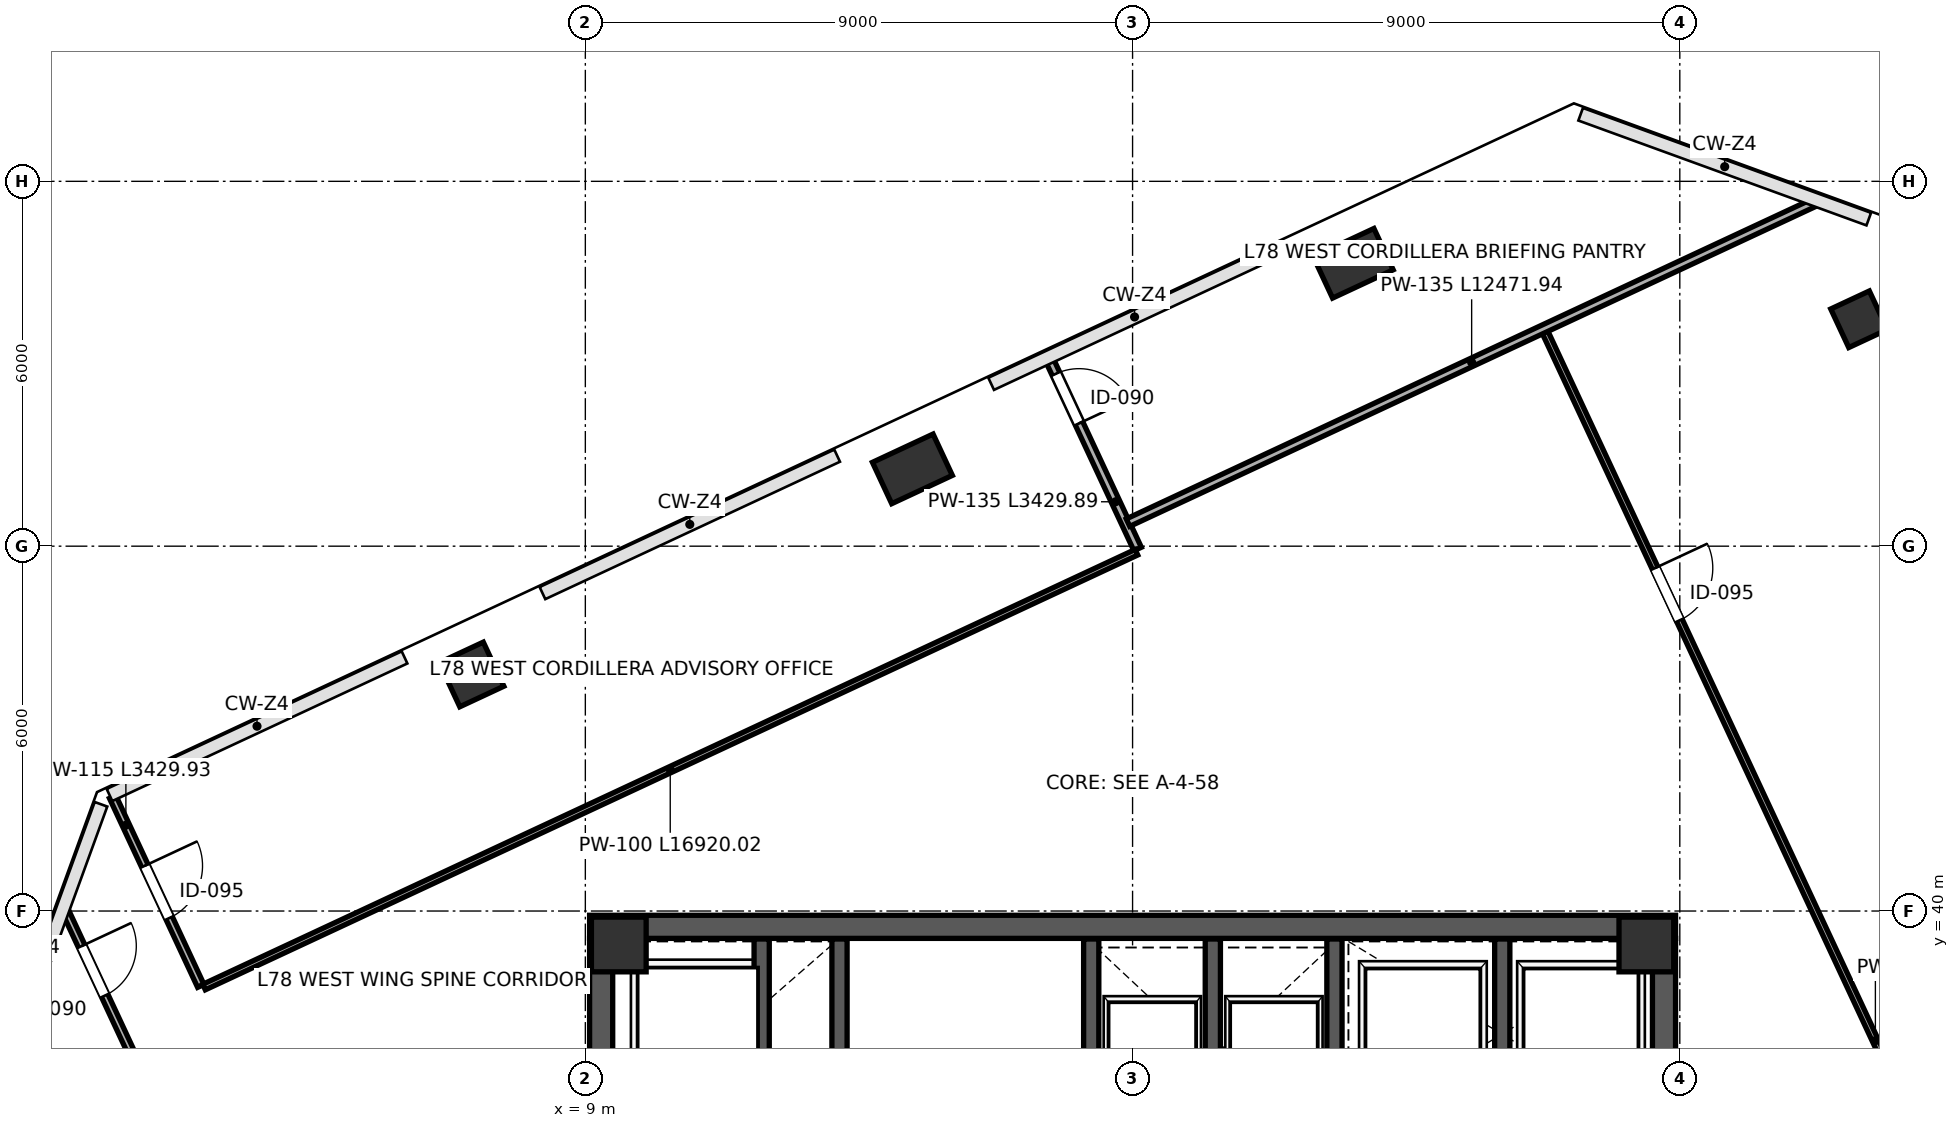
"""IFC4 building model, lengths in metres.
Left out: names, types, materials, properties, quantities, classifications, styles, units other than length and angle.
Written with IfcOpenShell. Run it as: python <this file> out.ifc"""

import sys

from ifc_helpers import new_model, si_unit, direction, frame, frame_2d, origin, origin_2d, place, context, subcontext, project, spatial, rectangle, extrude, clip, halfspace, source, transform, mapped, element, fill, save


model = new_model("IFC4")
c1 = context("Model", 3, precision=1e-05, world=origin(), true_north=direction((0.0, 1.0)))
c2 = subcontext(c1, "Body", "Model", "MODEL_VIEW")
j1 = project(units=[si_unit("LENGTHUNIT", "METRE"), si_unit("PLANEANGLEUNIT", "RADIAN")], contexts=[c1])
p1 = place(None, origin())
s1 = spatial("IfcSite", under=j1, at=p1, CompositionType="ELEMENT")
p2 = place(p1, origin())
s2 = spatial("IfcBuilding", under=s1, at=p2, CompositionType="ELEMENT")
p3 = place(p2, frame((0.0, 0.0, 345.0)))
s3 = spatial("IfcBuildingStorey", under=s2, at=p3, CompositionType="ELEMENT", Elevation=345.0)
m1 = source(origin(), c2, "Body", "SweptSolid", [
    extrude(rectangle(XDim=0.9, YDim=0.9, at=origin_2d()), origin(), (0.0, 0.0, 1.0), 4.198),
])
for number, where, z_axis, x_axis in (
    (1, (9.55, 39.45, 0.001), (0.0, 0.0, 1.0), (1.0, 0.0, 0.0)),
    (2, (26.45, 39.45, 0.001), (0.0, 0.0, 1.0), (1.0, 0.0, 0.0)),
):
    element("IfcColumn", number, at=place(p3, frame(where, z_axis=z_axis, x_axis=x_axis)), inside=s3, PredefinedType="COLUMN", context=c2, shape_type="MappedRepresentation", body=[
        mapped(m1, transform((0.0, 0.0, 0.0), scale=1.0)),
    ])
p4 = place(p3, frame((29.948, 49.731, 0.0), z_axis=(0.178557414526, -0.08987674645, 0.979816013426), x_axis=(-0.98321057794, 0.02176204754, 0.181172218384)))
e3 = element("IfcColumn", 3, at=p4, inside=s3, PredefinedType="COLUMN", context=c2, shape_type="Clipping", body=[
    clip(clip(extrude(rectangle(XDim=0.7, YDim=0.7, at=origin_2d()), origin(), (0.0, 0.0, 1.0), 4.286), halfspace(frame((0.0, 0.0, 0.096), z_axis=(0.0, 0.0, -1.0), x_axis=(1.0, 0.0, 0.0)), False)), halfspace(frame((0.0, 0.0, 4.191), z_axis=(0.0, 0.0, 1.0), x_axis=(1.0, 0.0, 0.0)), False)),
])
p5 = place(p3, frame((7.128, 43.89, 0.0), z_axis=(0.124408828393, 0.143869108431, 0.981745447179), x_axis=(-0.262317770415, -0.949460239356, 0.172379352608)))
e4 = element("IfcColumn", 4, at=p5, inside=s3, PredefinedType="COLUMN", context=c2, shape_type="Clipping", body=[
    clip(clip(extrude(rectangle(XDim=0.8, YDim=0.8, at=origin_2d()), origin(), (0.0, 0.0, 1.0), 4.278), halfspace(frame((0.0, 0.0, 0.104), z_axis=(0.0, 0.0, -1.0), x_axis=(1.0, 0.0, 0.0)), False)), halfspace(frame((0.0, 0.0, 4.174), z_axis=(0.0, 0.0, 1.0), x_axis=(1.0, 0.0, 0.0)), False)),
])
p6 = place(p3, frame((14.379, 47.271, 0.0), z_axis=(0.157805484492, 0.069455026375, 0.985024582625), x_axis=(-0.646847803691, -0.74643867604, 0.156260109342)))
e5 = element("IfcColumn", 5, at=p6, inside=s3, PredefinedType="PILASTER", context=c2, shape_type="Clipping", body=[
    clip(clip(extrude(rectangle(XDim=0.75, YDim=1.1, at=origin_2d()), origin(), (0.0, 0.0, 1.0), 4.264), halfspace(frame((0.0, 0.0, 0.101), z_axis=(0.0, 0.0, -1.0), x_axis=(1.0, 0.0, 0.0)), False)), halfspace(frame((0.0, 0.0, 4.163), z_axis=(0.0, 0.0, 1.0), x_axis=(1.0, 0.0, 0.0)), False)),
])
p7 = place(p3, frame((21.629, 50.652, 0.0), z_axis=(0.190150420075, -0.005421455554, 0.981739998964), x_axis=(-0.901441729495, -0.39708863024, 0.172404837691)))
e6 = element("IfcColumn", 6, at=p7, inside=s3, PredefinedType="PILASTER", context=c2, shape_type="Clipping", body=[
    clip(clip(extrude(rectangle(XDim=0.75, YDim=1.1, at=origin_2d()), origin(), (0.0, 0.0, 1.0), 4.278), halfspace(frame((0.0, 0.0, 0.112), z_axis=(0.0, 0.0, -1.0), x_axis=(1.0, 0.0, 0.0)), False)), halfspace(frame((0.0, 0.0, 4.167), z_axis=(0.0, 0.0, 1.0), x_axis=(1.0, 0.0, 0.0)), False)),
])
p8 = place(p3, frame((9.26, 24.45, 0.0), z_axis=(0.0, 0.0, 1.0), x_axis=(0.0, 1.0, 0.0)))
e7 = element("IfcWall", 7, at=p8, inside=s3, PredefinedType="SHEAR", context=c2, shape_type="SweptSolid", body=[
    extrude(rectangle(XDim=15.1, YDim=0.38, at=frame_2d((7.55, 0.0))), origin(), (0.0, 0.0, 1.0), 3.92),
])
p9 = place(p8, frame((8.7, 0.0, 0.0)))
e8 = element("IfcOpeningElement", 8, at=p9, cuts=e7, PredefinedType="OPENING", context=c2, shape_type="SweptSolid", body=[
    extrude(rectangle(XDim=1.15, YDim=2.2, at=frame_2d((0.575, 1.1))), frame((0.0, 0.2, 0.0), z_axis=(0.0, -1.0, 0.0), x_axis=(1.0, 0.0, 0.0)), (0.0, 0.0, 1.0), 0.4),
])
p10 = place(p3, frame((26.74, 24.45, 0.0), z_axis=(0.0, 0.0, 1.0), x_axis=(0.0, 1.0, 0.0)))
e9 = element("IfcWall", 9, at=p10, inside=s3, PredefinedType="SHEAR", context=c2, shape_type="SweptSolid", body=[
    extrude(rectangle(XDim=15.1, YDim=0.38, at=frame_2d((7.55, 0.0))), origin(), (0.0, 0.0, 1.0), 3.92),
])
p11 = place(p10, frame((8.6, 0.0, 0.0)))
e10 = element("IfcOpeningElement", 10, at=p11, cuts=e9, PredefinedType="OPENING", context=c2, shape_type="SweptSolid", body=[
    extrude(rectangle(XDim=1.15, YDim=2.2, at=frame_2d((0.575, 1.1))), frame((0.0, 0.2, 0.0), z_axis=(0.0, -1.0, 0.0), x_axis=(1.0, 0.0, 0.0)), (0.0, 0.0, 1.0), 0.4),
])
p12 = place(p3, frame((9.07, 39.74, 0.0), z_axis=(0.0, 0.0, 1.0), x_axis=(1.0, 0.0, 0.0)))
e11 = element("IfcWall", 11, at=p12, inside=s3, PredefinedType="SHEAR", context=c2, shape_type="SweptSolid", body=[
    extrude(rectangle(XDim=17.86, YDim=0.38, at=frame_2d((8.93, 0.0))), origin(), (0.0, 0.0, 1.0), 3.92),
])
p13 = place(p3, frame((21.32, 32.12, 0.0), z_axis=(0.0, 0.0, 1.0), x_axis=(0.0, 1.0, 0.0)))
e12 = element("IfcWall", 12, at=p13, inside=s3, PredefinedType="SHEAR", context=c2, shape_type="SweptSolid", body=[
    extrude(rectangle(XDim=7.42, YDim=0.25, at=frame_2d((3.71, 0.0))), origin(), (0.0, 0.0, 1.0), 3.92),
])
p14 = place(p13, frame((1.4, 0.0, 0.0)))
e13 = element("IfcOpeningElement", 13, at=p14, cuts=e12, PredefinedType="OPENING", context=c2, shape_type="SweptSolid", body=[
    extrude(rectangle(XDim=1.15, YDim=2.2, at=frame_2d((0.575, 1.1))), frame((0.0, 0.135, 0.0), z_axis=(0.0, -1.0, 0.0), x_axis=(1.0, 0.0, 0.0)), (0.0, 0.0, 1.0), 0.27),
])
p15 = place(p3, frame((11.9, 36.31, 0.0), z_axis=(0.0, 0.0, 1.0), x_axis=(0.0, 1.0, 0.0)))
e14 = element("IfcWall", 14, at=p15, inside=s3, PredefinedType="SHEAR", context=c2, shape_type="SweptSolid", body=[
    extrude(rectangle(XDim=3.23, YDim=0.25, at=frame_2d((1.615, 0.0))), origin(), (0.0, 0.0, 1.0), 3.92),
])
p16 = place(p3, frame((24.08, 36.48, 0.0), z_axis=(0.0, 0.0, 1.0), x_axis=(0.0, 1.0, 0.0)))
e15 = element("IfcWall", 15, at=p16, inside=s3, PredefinedType="SHEAR", context=c2, shape_type="SweptSolid", body=[
    extrude(rectangle(XDim=3.06, YDim=0.25, at=frame_2d((1.53, 0.0))), origin(), (0.0, 0.0, 1.0), 3.92),
])
p17 = place(p3, frame((13.18, 36.2, 0.0), z_axis=(0.0, 0.0, 1.0), x_axis=(0.0, 1.0, 0.0)))
e16 = element("IfcWall", 16, at=p17, inside=s3, PredefinedType="SHEAR", context=c2, shape_type="SweptSolid", body=[
    extrude(rectangle(XDim=3.34, YDim=0.25, at=frame_2d((1.67, 0.0))), origin(), (0.0, 0.0, 1.0), 3.92),
])
for number, where, z_axis, x_axis in (
    (17, (17.32, 35.81, 0.0), (0.0, 0.0, 1.0), (0.0, 1.0, 0.0)),
    (18, (19.32, 35.81, 0.0), (0.0, 0.0, 1.0), (0.0, 1.0, 0.0)),
):
    element("IfcWall", number, at=place(p3, frame(where, z_axis=z_axis, x_axis=x_axis)), inside=s3, PredefinedType="SHEAR", context=c2, shape_type="SweptSolid", body=[
        extrude(rectangle(XDim=3.73, YDim=0.25, at=frame_2d((1.865, 0.0))), origin(), (0.0, 0.0, 1.0), 3.92),
    ])
p18 = place(p3, frame((0.441, 40.013, 0.0), z_axis=(0.0, 0.0, 1.0), x_axis=(0.422618958231, -0.906307462258, 0.0)))
e19 = element("IfcWall", 19, at=p18, inside=s3, PredefinedType="PARTITIONING", context=c2, shape_type="SweptSolid", body=[
    extrude(rectangle(XDim=7.172, YDim=0.115, at=frame_2d((3.586, 0.0))), origin(), (0.0, 0.0, 1.0), 3.92),
])
p19 = place(p18, frame((0.65, 0.0, 0.0)))
e20 = element("IfcOpeningElement", 20, at=p19, cuts=e19, PredefinedType="OPENING", context=c2, shape_type="SweptSolid", body=[
    extrude(rectangle(XDim=0.9, YDim=2.15, at=frame_2d((0.45, 1.075))), frame((0.0, 0.067, 0.0), z_axis=(0.0, -1.0, 0.0), x_axis=(1.0, 0.0, 0.0)), (0.0, 0.0, 1.0), 0.135),
])
p20 = place(p18, frame((5.55, 0.0, 0.0)))
e21 = element("IfcOpeningElement", 21, at=p20, cuts=e19, PredefinedType="OPENING", context=c2, shape_type="SweptSolid", body=[
    extrude(rectangle(XDim=0.95, YDim=2.15, at=frame_2d((0.475, 1.075))), frame((0.0, 0.067, 0.0), z_axis=(0.0, -1.0, 0.0), x_axis=(1.0, 0.0, 0.0)), (0.0, 0.0, 1.0), 0.135),
])
p21 = place(p3, frame((24.775, 49.537, 0.0), z_axis=(0.0, 0.0, 1.0), x_axis=(0.422615543458, -0.906309054588, 0.0)))
e22 = element("IfcWall", 22, at=p21, inside=s3, PredefinedType="PARTITIONING", context=c2, shape_type="SweptSolid", body=[
    extrude(rectangle(XDim=25.75, YDim=0.1, at=frame_2d((12.875, 0.0))), origin(), (0.0, 0.0, 1.0), 3.92),
])
p22 = place(p21, frame((4.3, 0.0, 0.0)))
e23 = element("IfcOpeningElement", 23, at=p22, cuts=e22, PredefinedType="OPENING", context=c2, shape_type="SweptSolid", body=[
    extrude(rectangle(XDim=0.95, YDim=2.15, at=frame_2d((0.475, 1.075))), frame((0.0, 0.06, 0.0), z_axis=(0.0, -1.0, 0.0), x_axis=(1.0, 0.0, 0.0)), (0.0, 0.0, 1.0), 0.12),
])
p23 = place(p3, frame((16.633, 49.062, 0.0), z_axis=(0.0, 0.0, 1.0), x_axis=(0.422675027226, -0.906281314692, 0.0)))
e24 = element("IfcWall", 24, at=p23, inside=s3, PredefinedType="PARTITIONING", context=c2, shape_type="SweptSolid", body=[
    extrude(rectangle(XDim=3.43, YDim=0.135, at=frame_2d((1.715, 0.0))), origin(), (0.0, 0.0, 1.0), 3.255),
])
p24 = place(p23, frame((0.25, 0.0, 0.0)))
e25 = element("IfcOpeningElement", 25, at=p24, cuts=e24, PredefinedType="OPENING", context=c2, shape_type="SweptSolid", body=[
    extrude(rectangle(XDim=0.9, YDim=2.15, at=frame_2d((0.45, 1.075))), frame((0.0, 0.078, 0.0), z_axis=(0.0, -1.0, 0.0), x_axis=(1.0, 0.0, 0.0)), (0.0, 0.0, 1.0), 0.155),
])
p25 = place(p3, frame((1.226, 41.877, 0.0), z_axis=(0.0, 0.0, 1.0), x_axis=(0.422616560059, -0.906308580542, 0.0)))
e26 = element("IfcWall", 26, at=p25, inside=s3, PredefinedType="PARTITIONING", context=c2, shape_type="SweptSolid", body=[
    extrude(rectangle(XDim=3.43, YDim=0.115, at=frame_2d((1.715, 0.0))), origin(), (0.0, 0.0, 1.0), 3.92),
])
p26 = place(p25, frame((1.25, 0.0, 0.0)))
e27 = element("IfcOpeningElement", 27, at=p26, cuts=e26, PredefinedType="OPENING", context=c2, shape_type="SweptSolid", body=[
    extrude(rectangle(XDim=0.95, YDim=2.15, at=frame_2d((0.475, 1.075))), frame((0.0, 0.067, 0.0), z_axis=(0.0, -1.0, 0.0), x_axis=(1.0, 0.0, 0.0)), (0.0, 0.0, 1.0), 0.135),
])
p27 = place(p3, frame((2.729, 38.749, 0.0), z_axis=(0.0, 0.0, 1.0), x_axis=(0.906303643754, 0.422627146926, 0.0)))
e28 = element("IfcWall", 28, at=p27, inside=s3, PredefinedType="PARTITIONING", context=c2, shape_type="SweptSolid", body=[
    extrude(rectangle(XDim=16.92, YDim=0.1, at=frame_2d((8.46, 0.0))), origin(), (0.0, 0.0, 1.0), 3.212),
])
p28 = place(p3, frame((17.925, 46.387, 0.0), z_axis=(0.0, 0.0, 1.0), x_axis=(0.906304624979, 0.422625042729, 0.0)))
e29 = element("IfcWall", 29, at=p28, inside=s3, PredefinedType="PARTITIONING", context=c2, shape_type="SweptSolid", body=[
    extrude(rectangle(XDim=12.472, YDim=0.135, at=frame_2d((6.236, 0.0))), origin(), (0.0, 0.0, 1.0), 3.212),
])
m2 = source(origin(), c2, "Body", "SweptSolid", [
    extrude(rectangle(XDim=0.9, YDim=2.15, at=frame_2d((0.45, 1.075))), frame((0.0, 0.025, 0.0), z_axis=(0.0, -1.0, 0.0), x_axis=(1.0, 0.0, 0.0)), (0.0, 0.0, 1.0), 0.05),
])
p29 = place(p19, origin())
e30 = element("IfcDoor", 30, at=p29, inside=s3, OperationType="SINGLE_SWING_LEFT", PredefinedType="DOOR", context=c2, shape_type="MappedRepresentation", body=[
    mapped(m2, transform((0.0, 0.0, 0.0), scale=1.0)),
])
fill(e20, e30)
m3 = source(origin(), c2, "Body", "SweptSolid", [
    extrude(rectangle(XDim=0.95, YDim=2.15, at=frame_2d((0.475, 1.075))), frame((0.0, 0.025, 0.0), z_axis=(0.0, -1.0, 0.0), x_axis=(1.0, 0.0, 0.0)), (0.0, 0.0, 1.0), 0.05),
])
p30 = place(p22, origin())
e31 = element("IfcDoor", 31, at=p30, inside=s3, OperationType="SINGLE_SWING_LEFT", PredefinedType="DOOR", context=c2, shape_type="MappedRepresentation", body=[
    mapped(m3, transform((0.0, 0.0, 0.0), scale=1.0)),
])
fill(e23, e31)
p31 = place(p26, origin())
e32 = element("IfcDoor", 32, at=p31, inside=s3, OperationType="SINGLE_SWING_LEFT", PredefinedType="DOOR", context=c2, shape_type="MappedRepresentation", body=[
    mapped(m3, transform((0.0, 0.0, 0.0), scale=1.0)),
])
fill(e27, e32)
p32 = place(p24, origin())
e33 = element("IfcDoor", 33, at=p32, inside=s3, OperationType="SINGLE_SWING_RIGHT", PredefinedType="DOOR", context=c2, shape_type="MappedRepresentation", body=[
    mapped(m2, transform((0.0, 0.0, 0.0), scale=1.0)),
])
fill(e25, e33)
save(model, sys.argv[1])
